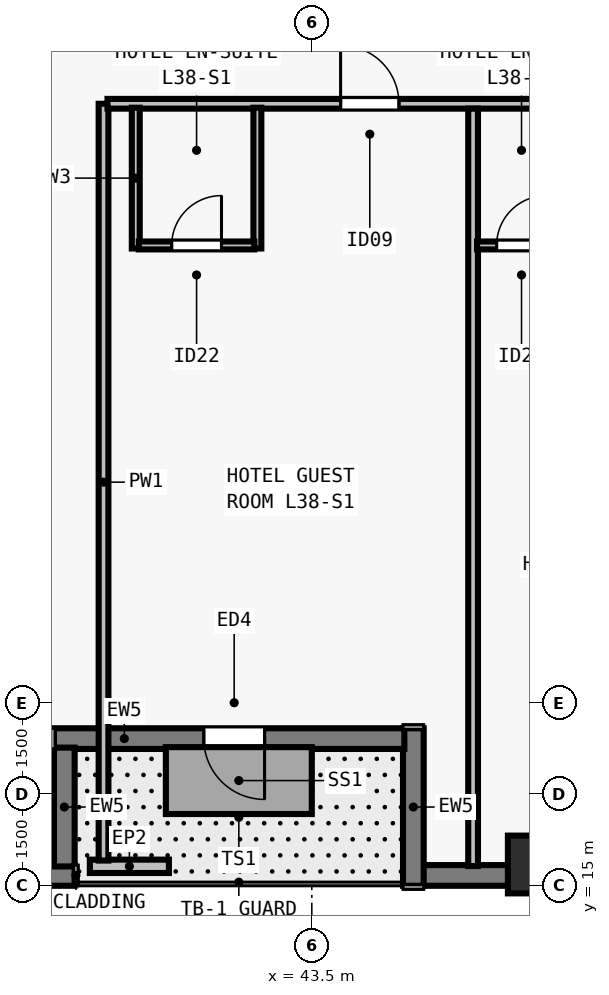
"""IFC4 building model, lengths in metres.
Left out: names, types, materials, properties, quantities, classifications, styles, units other than length and angle.
Written with IfcOpenShell. Run it as: python <this file> out.ifc"""

import sys

from ifc_helpers import new_model, si_unit, direction, frame, frame_2d, origin, origin_2d, place, context, subcontext, project, spatial, rectangle, extrude, element, fill, save


model = new_model("IFC4")
c1 = context("Model", 3, precision=1e-05, world=origin(), true_north=direction((0.0, 1.0)))
c2 = subcontext(c1, "Body", "Model", "MODEL_VIEW")
j1 = project(units=[si_unit("LENGTHUNIT", "METRE"), si_unit("PLANEANGLEUNIT", "RADIAN")], contexts=[c1])
p1 = place(None, origin())
s1 = spatial("IfcSite", under=j1, at=p1, CompositionType="ELEMENT")
p2 = place(p1, origin())
s2 = spatial("IfcBuilding", under=s1, at=p2, CompositionType="ELEMENT")
p3 = place(p2, frame((0.0, 0.0, 141.0)))
s3 = spatial("IfcBuildingStorey", under=s2, at=p3, CompositionType="ELEMENT", Elevation=141.0)
p4 = place(p3, frame((47.2, 15.35, 0.0), z_axis=(0.0, 0.0, 1.0), x_axis=(1.0, 0.0, 0.0)))
e1 = element("IfcColumn", 1, at=p4, inside=s3, PredefinedType="COLUMN", context=c2, shape_type="SweptSolid", body=[
    extrude(rectangle(XDim=0.95, YDim=0.95, at=origin_2d()), origin(), (0.0, 0.0, 1.0), 3.5),
])
p5 = place(p3, frame((39.6, 15.17, 0.0), z_axis=(0.0, 0.0, 1.0), x_axis=(-1.0, 0.0, 0.0)))
e2 = element("IfcWall", 2, at=p5, inside=s3, PredefinedType="SOLIDWALL", context=c2, shape_type="SweptSolid", body=[
    extrude(rectangle(XDim=7.282, YDim=0.34, at=frame_2d((3.641, 0.0))), origin(), (0.0, 0.0, 1.0), 3.28),
])
p6 = place(p3, frame((72.0, 15.17, 0.0), z_axis=(0.0, 0.0, 1.0), x_axis=(-1.0, 0.0, 0.0)))
e3 = element("IfcWall", 3, at=p6, inside=s3, PredefinedType="SOLIDWALL", context=c2, shape_type="SweptSolid", body=[
    extrude(rectangle(XDim=26.682, YDim=0.34, at=frame_2d((13.341, 0.0))), origin(), (0.0, 0.0, 1.0), 3.28),
])
p7 = place(p6, frame((5.923, 0.0, 0.8)))
e4 = element("IfcOpeningElement", 4, at=p7, cuts=e3, PredefinedType="OPENING", context=c2, shape_type="SweptSolid", body=[
    extrude(rectangle(XDim=1.35, YDim=1.66, at=frame_2d((0.675, 0.83))), frame((0.0, 0.18, 0.0), z_axis=(0.0, -1.0, 0.0), x_axis=(1.0, 0.0, 0.0)), (0.0, 0.0, 1.0), 0.36),
])
p8 = place(p6, frame((12.666, 0.0, 0.8)))
e5 = element("IfcOpeningElement", 5, at=p8, cuts=e3, PredefinedType="OPENING", context=c2, shape_type="SweptSolid", body=[
    extrude(rectangle(XDim=1.35, YDim=1.66, at=frame_2d((0.675, 0.83))), frame((0.0, 0.18, 0.0), z_axis=(0.0, -1.0, 0.0), x_axis=(1.0, 0.0, 0.0)), (0.0, 0.0, 1.0), 0.36),
])
p9 = place(p6, frame((16.262, 0.0, 0.8)))
e6 = element("IfcOpeningElement", 6, at=p9, cuts=e3, PredefinedType="OPENING", context=c2, shape_type="SweptSolid", body=[
    extrude(rectangle(XDim=1.75, YDim=1.66, at=frame_2d((0.875, 0.83))), frame((0.0, 0.18, 0.0), z_axis=(0.0, -1.0, 0.0), x_axis=(1.0, 0.0, 0.0)), (0.0, 0.0, 1.0), 0.36),
])
p10 = place(p6, frame((19.409, 0.0, 0.8)))
e7 = element("IfcOpeningElement", 7, at=p10, cuts=e3, PredefinedType="OPENING", context=c2, shape_type="SweptSolid", body=[
    extrude(rectangle(XDim=1.35, YDim=1.66, at=frame_2d((0.675, 0.83))), frame((0.0, 0.18, 0.0), z_axis=(0.0, -1.0, 0.0), x_axis=(1.0, 0.0, 0.0)), (0.0, 0.0, 1.0), 0.36),
])
p11 = place(p6, frame((21.59, 0.0, 0.8)))
e8 = element("IfcOpeningElement", 8, at=p11, cuts=e3, PredefinedType="OPENING", context=c2, shape_type="SweptSolid", body=[
    extrude(rectangle(XDim=0.9, YDim=1.66, at=frame_2d((0.45, 0.83))), frame((0.0, 0.18, 0.0), z_axis=(0.0, -1.0, 0.0), x_axis=(1.0, 0.0, 0.0)), (0.0, 0.0, 1.0), 0.36),
])
p12 = place(p3, frame((45.17, 15.0, 0.0), z_axis=(0.0, 0.0, 1.0), x_axis=(0.0, 1.0, 0.0)))
e9 = element("IfcWall", 9, at=p12, inside=s3, PredefinedType="SOLIDWALL", context=c2, shape_type="SweptSolid", body=[
    extrude(rectangle(XDim=2.59, YDim=0.34, at=frame_2d((1.295, 0.0))), origin(), (0.0, 0.0, 1.0), 3.28),
])
p13 = place(p3, frame((45.022, 17.42, 0.0), z_axis=(0.0, 0.0, 1.0), x_axis=(-1.0, 0.0, 0.0)))
e10 = element("IfcWall", 10, at=p13, inside=s3, PredefinedType="SOLIDWALL", context=c2, shape_type="SweptSolid", body=[
    extrude(rectangle(XDim=5.762, YDim=0.34, at=frame_2d((2.881, 0.0))), origin(), (0.0, 0.0, 1.0), 3.28),
])
p14 = place(p13, frame((2.299, 0.0, 0.0)))
e11 = element("IfcOpeningElement", 11, at=p14, cuts=e10, PredefinedType="OPENING", context=c2, shape_type="SweptSolid", body=[
    extrude(rectangle(XDim=1.0, YDim=2.15, at=frame_2d((0.5, 1.075))), frame((0.0, 0.18, 0.0), z_axis=(0.0, -1.0, 0.0), x_axis=(1.0, 0.0, 0.0)), (0.0, 0.0, 1.0), 0.36),
])
p15 = place(p3, frame((39.43, 17.272, 0.0), z_axis=(0.0, 0.0, 1.0), x_axis=(0.0, -1.0, 0.0)))
e12 = element("IfcWall", 12, at=p15, inside=s3, PredefinedType="SOLIDWALL", context=c2, shape_type="SweptSolid", body=[
    extrude(rectangle(XDim=1.954, YDim=0.34, at=frame_2d((0.977, 0.0))), origin(), (0.0, 0.0, 1.0), 3.28),
])
p16 = place(p3, frame((39.85, 15.32, 0.0), z_axis=(0.0, 0.0, 1.0), x_axis=(1.0, 0.0, 0.0)))
e13 = element("IfcWall", 13, at=p16, inside=s3, PredefinedType="PARAPET", context=c2, shape_type="SweptSolid", body=[
    extrude(rectangle(XDim=1.3, YDim=0.22, at=frame_2d((0.65, 0.0))), origin(), (0.0, 0.0, 1.0), 0.55),
])
p17 = place(p3, frame((40.075, 15.415, 0.0), z_axis=(0.0, 0.0, 1.0), x_axis=(0.0, 1.0, 0.0)))
e14 = element("IfcWall", 14, at=p17, inside=s3, PredefinedType="PARTITIONING", context=c2, shape_type="SweptSolid", body=[
    extrude(rectangle(XDim=12.445, YDim=0.16, at=frame_2d((6.223, 0.0))), origin(), (0.0, 0.0, 1.0), 2.555),
])
p18 = place(p3, frame((40.14, 27.86, 0.0), z_axis=(0.0, 0.0, 1.0), x_axis=(1.0, 0.0, 0.0)))
e15 = element("IfcWall", 15, at=p18, inside=s3, PredefinedType="PARTITIONING", context=c2, shape_type="SweptSolid", body=[
    extrude(rectangle(XDim=22.07, YDim=0.16, at=frame_2d((11.035, 0.0))), origin(), (0.0, 0.0, 1.0), 3.28),
])
p19 = place(p18, frame((3.834, 0.0, 0.0)))
e16 = element("IfcOpeningElement", 16, at=p19, cuts=e15, PredefinedType="OPENING", context=c2, shape_type="SweptSolid", body=[
    extrude(rectangle(XDim=0.96, YDim=2.15, at=frame_2d((0.48, 1.075))), frame((0.0, 0.09, 0.0), z_axis=(0.0, -1.0, 0.0), x_axis=(1.0, 0.0, 0.0)), (0.0, 0.0, 1.0), 0.18),
])
p20 = place(p18, frame((8.746, 0.0, 0.0)))
e17 = element("IfcOpeningElement", 17, at=p20, cuts=e15, PredefinedType="OPENING", context=c2, shape_type="SweptSolid", body=[
    extrude(rectangle(XDim=0.96, YDim=2.15, at=frame_2d((0.48, 1.075))), frame((0.0, 0.09, 0.0), z_axis=(0.0, -1.0, 0.0), x_axis=(1.0, 0.0, 0.0)), (0.0, 0.0, 1.0), 0.18),
])
p21 = place(p18, frame((14.46, 0.0, 0.0)))
e18 = element("IfcOpeningElement", 18, at=p21, cuts=e15, PredefinedType="OPENING", context=c2, shape_type="SweptSolid", body=[
    extrude(rectangle(XDim=0.96, YDim=2.15, at=frame_2d((0.48, 1.075))), frame((0.0, 0.09, 0.0), z_axis=(0.0, -1.0, 0.0), x_axis=(1.0, 0.0, 0.0)), (0.0, 0.0, 1.0), 0.18),
])
p22 = place(p18, frame((19.993, 0.0, 0.0)))
e19 = element("IfcOpeningElement", 19, at=p22, cuts=e15, PredefinedType="OPENING", context=c2, shape_type="SweptSolid", body=[
    extrude(rectangle(XDim=0.96, YDim=2.15, at=frame_2d((0.48, 1.075))), frame((0.0, 0.09, 0.0), z_axis=(0.0, -1.0, 0.0), x_axis=(1.0, 0.0, 0.0)), (0.0, 0.0, 1.0), 0.18),
])
p23 = place(p3, frame((40.605, 25.48, 0.0), z_axis=(0.0, 0.0, 1.0), x_axis=(0.0, 1.0, 0.0)))
e20 = element("IfcWall", 20, at=p23, inside=s3, PredefinedType="PLUMBINGWALL", context=c2, shape_type="SweptSolid", body=[
    extrude(rectangle(XDim=2.315, YDim=0.13, at=frame_2d((1.157, 0.0))), origin(), (0.0, 0.0, 1.0), 2.555),
])
p24 = place(p3, frame((42.605, 25.48, 0.0), z_axis=(0.0, 0.0, 1.0), x_axis=(0.0, 1.0, 0.0)))
e21 = element("IfcWall", 21, at=p24, inside=s3, PredefinedType="PLUMBINGWALL", context=c2, shape_type="SweptSolid", body=[
    extrude(rectangle(XDim=2.315, YDim=0.13, at=frame_2d((1.157, 0.0))), origin(), (0.0, 0.0, 1.0), 3.28),
])
p25 = place(p3, frame((40.655, 25.53, 0.0), z_axis=(0.0, 0.0, 1.0), x_axis=(1.0, 0.0, 0.0)))
e22 = element("IfcWall", 22, at=p25, inside=s3, PredefinedType="PLUMBINGWALL", context=c2, shape_type="SweptSolid", body=[
    extrude(rectangle(XDim=1.9, YDim=0.13, at=frame_2d((0.95, 0.0))), origin(), (0.0, 0.0, 1.0), 3.28),
])
p26 = place(p25, frame((0.54, 0.0, 0.0)))
e23 = element("IfcOpeningElement", 23, at=p26, cuts=e22, PredefinedType="OPENING", context=c2, shape_type="SweptSolid", body=[
    extrude(rectangle(XDim=0.82, YDim=2.1, at=frame_2d((0.41, 1.05))), frame((0.0, 0.075, 0.0), z_axis=(0.0, -1.0, 0.0), x_axis=(1.0, 0.0, 0.0)), (0.0, 0.0, 1.0), 0.15),
])
p27 = place(p3, frame((46.153, 15.325, 0.0), z_axis=(0.0, 0.0, 1.0), x_axis=(0.0, 1.0, 0.0)))
e24 = element("IfcWall", 24, at=p27, inside=s3, PredefinedType="PARTITIONING", context=c2, shape_type="SweptSolid", body=[
    extrude(rectangle(XDim=12.455, YDim=0.16, at=frame_2d((6.228, 0.0))), origin(), (0.0, 0.0, 1.0), 3.28),
])
p28 = place(p3, frame((46.218, 25.53, 0.0), z_axis=(0.0, 0.0, 1.0), x_axis=(1.0, 0.0, 0.0)))
e25 = element("IfcWall", 25, at=p28, inside=s3, PredefinedType="PLUMBINGWALL", context=c2, shape_type="SweptSolid", body=[
    extrude(rectangle(XDim=1.478, YDim=0.13, at=frame_2d((0.739, 0.0))), origin(), (0.0, 0.0, 1.0), 3.28),
])
p29 = place(p28, frame((0.321, 0.0, 0.0)))
e26 = element("IfcOpeningElement", 26, at=p29, cuts=e25, PredefinedType="OPENING", context=c2, shape_type="SweptSolid", body=[
    extrude(rectangle(XDim=0.82, YDim=2.1, at=frame_2d((0.41, 1.05))), frame((0.0, 0.075, 0.0), z_axis=(0.0, -1.0, 0.0), x_axis=(1.0, 0.0, 0.0)), (0.0, 0.0, 1.0), 0.15),
])
p30 = place(p14, origin())
e27 = element("IfcDoor", 27, at=p30, inside=s3, OperationType="SINGLE_SWING_LEFT", PredefinedType="DOOR", context=c2, shape_type="SweptSolid", body=[
    extrude(rectangle(XDim=1.0, YDim=2.15, at=frame_2d((0.5, 1.075))), frame((0.0, 0.025, 0.0), z_axis=(0.0, -1.0, 0.0), x_axis=(1.0, 0.0, 0.0)), (0.0, 0.0, 1.0), 0.05),
])
fill(e11, e27)
p31 = place(p26, origin())
e28 = element("IfcDoor", 28, at=p31, inside=s3, OperationType="SINGLE_SWING_RIGHT", PredefinedType="DOOR", context=c2, shape_type="SweptSolid", body=[
    extrude(rectangle(XDim=0.82, YDim=2.1, at=frame_2d((0.41, 1.05))), frame((0.0, 0.025, 0.0), z_axis=(0.0, -1.0, 0.0), x_axis=(1.0, 0.0, 0.0)), (0.0, 0.0, 1.0), 0.05),
])
fill(e23, e28)
p32 = place(p19, origin())
e29 = element("IfcDoor", 29, at=p32, inside=s3, OperationType="SINGLE_SWING_LEFT", PredefinedType="DOOR", context=c2, shape_type="SweptSolid", body=[
    extrude(rectangle(XDim=0.96, YDim=2.15, at=frame_2d((0.48, 1.075))), frame((0.0, 0.025, 0.0), z_axis=(0.0, -1.0, 0.0), x_axis=(1.0, 0.0, 0.0)), (0.0, 0.0, 1.0), 0.05),
])
fill(e16, e29)
p33 = place(p29, origin())
e30 = element("IfcDoor", 30, at=p33, inside=s3, OperationType="SINGLE_SWING_RIGHT", PredefinedType="DOOR", context=c2, shape_type="SweptSolid", body=[
    extrude(rectangle(XDim=0.82, YDim=2.1, at=frame_2d((0.41, 1.05))), frame((0.0, 0.025, 0.0), z_axis=(0.0, -1.0, 0.0), x_axis=(1.0, 0.0, 0.0)), (0.0, 0.0, 1.0), 0.05),
])
fill(e26, e30)
save(model, sys.argv[1])
